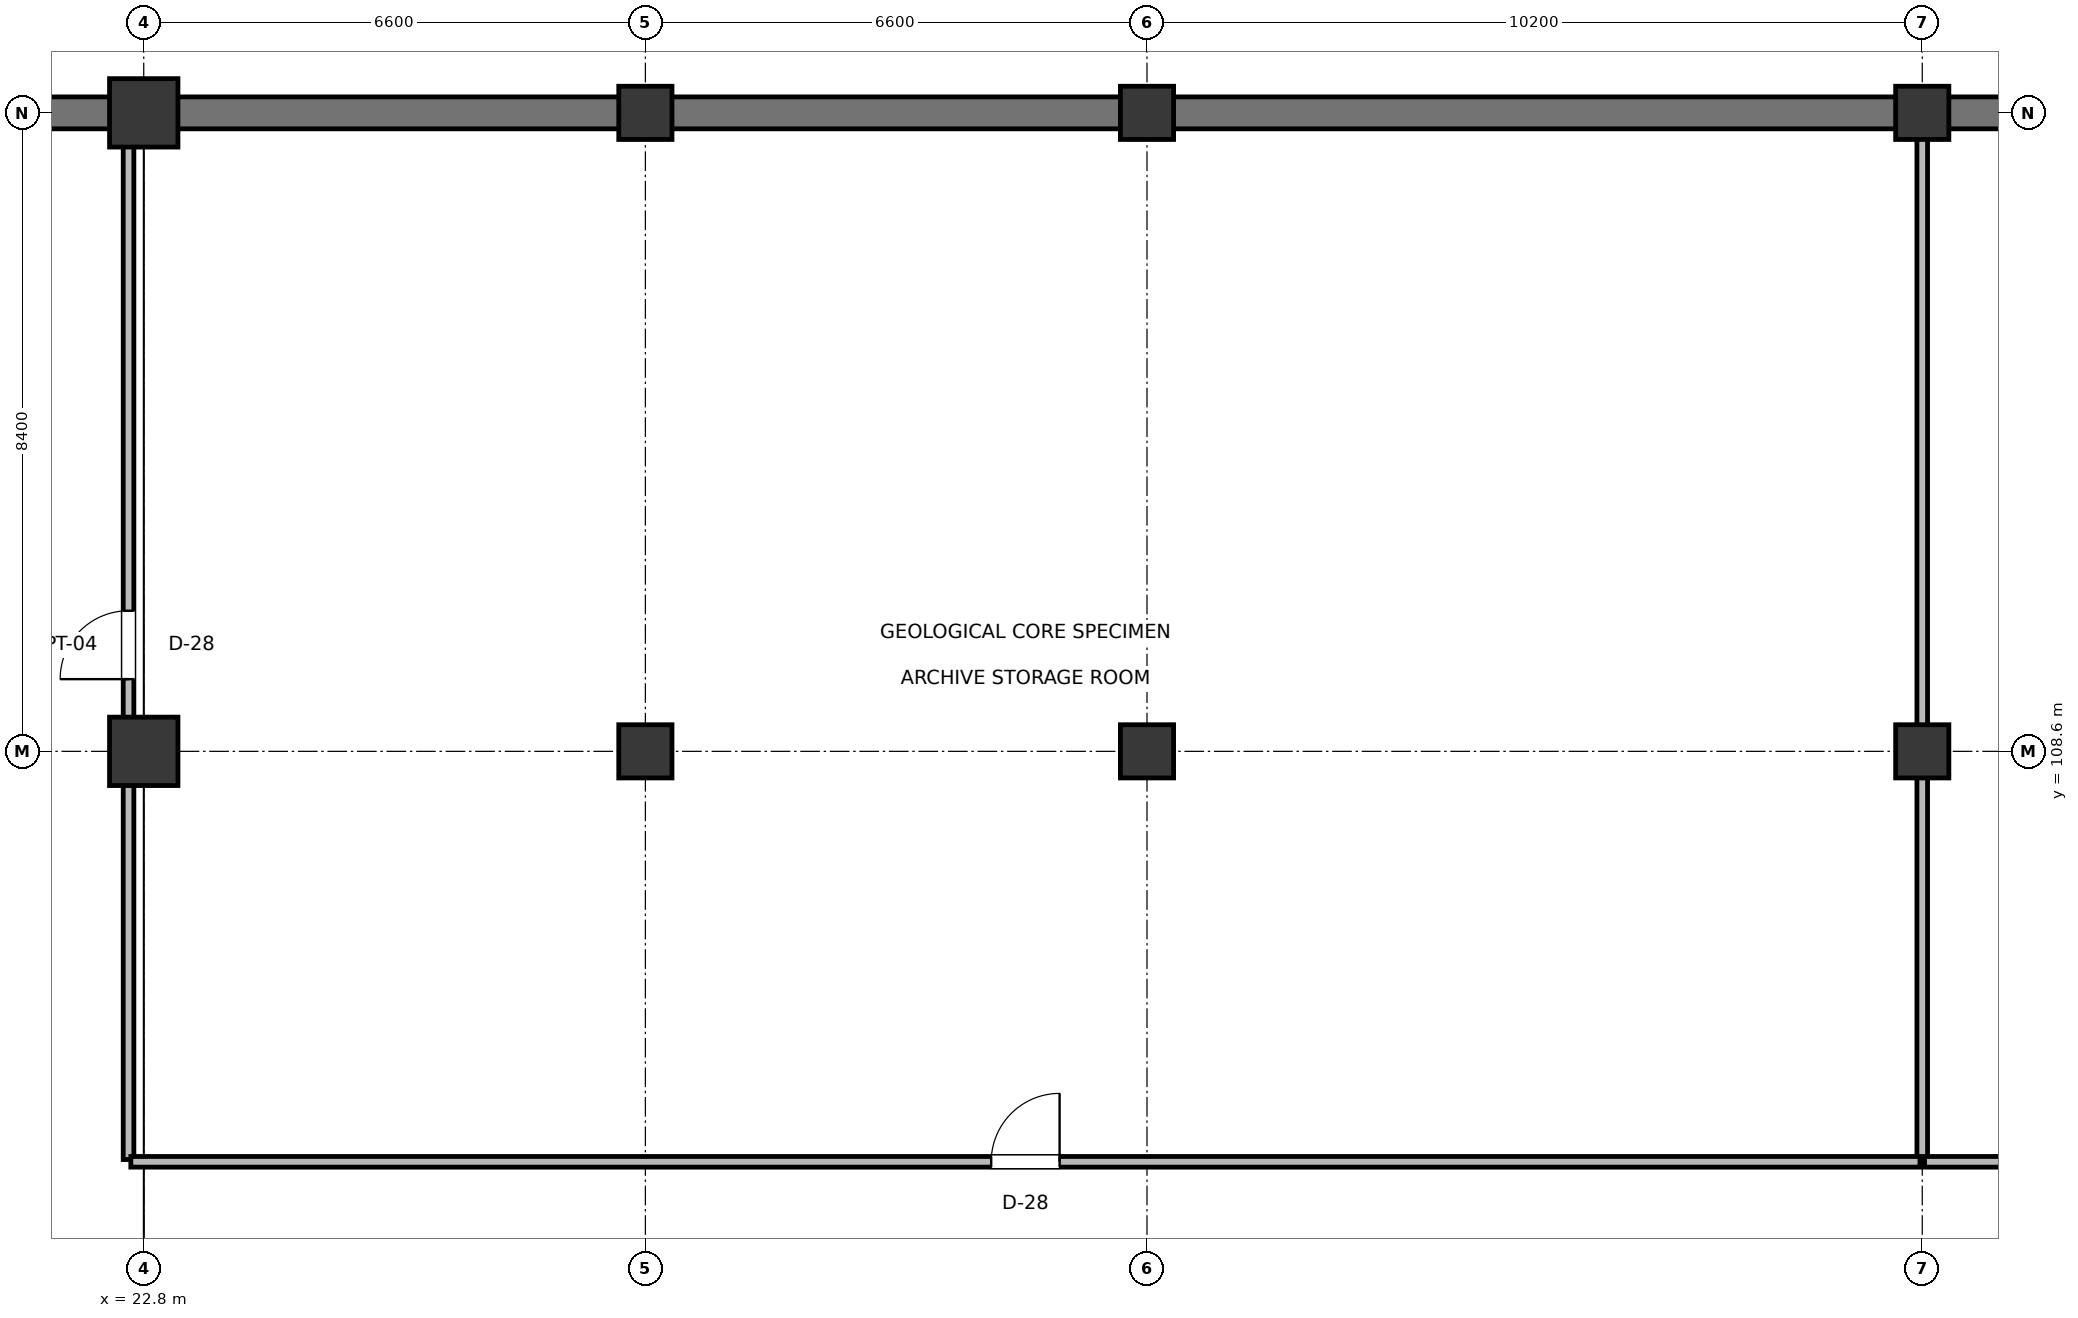
"""IFC4 building model, lengths in metres.
Left out: names, types, materials, properties, quantities, classifications, styles, units other than length and angle.
Written with IfcOpenShell. Run it as: python <this file> out.ifc"""

import sys

from ifc_helpers import new_model, si_unit, direction, frame, frame_2d, origin, origin_2d, place, context, subcontext, project, spatial, rectangle, extrude, element, fill, save


model = new_model("IFC4")
c1 = context("Model", 3, precision=1e-05, world=origin(), true_north=direction((0.0, 1.0)))
c2 = subcontext(c1, "Body", "Model", "MODEL_VIEW")
j1 = project(units=[si_unit("LENGTHUNIT", "METRE"), si_unit("PLANEANGLEUNIT", "RADIAN")], contexts=[c1])
p1 = place(None, origin())
s1 = spatial("IfcSite", under=j1, at=p1, CompositionType="ELEMENT")
p2 = place(p1, origin())
s2 = spatial("IfcBuilding", under=s1, at=p2, CompositionType="ELEMENT")
p3 = place(p2, frame((0.0, 0.0, -4.5)))
s3 = spatial("IfcBuildingStorey", under=s2, at=p3, CompositionType="ELEMENT", Elevation=-4.5)
for number, where, z_axis, x_axis in (
    (1, (22.8, 108.6, 0.0), (0.0, 0.0, 1.0), (1.0, 0.0, 0.0)),
    (2, (22.8, 117.0, 0.0), (0.0, 0.0, 1.0), (1.0, 0.0, 0.0)),
):
    element("IfcColumn", number, at=place(p3, frame(where, z_axis=z_axis, x_axis=x_axis)), inside=s3, PredefinedType="COLUMN", context=c2, shape_type="SweptSolid", body=[
        extrude(rectangle(XDim=0.9, YDim=0.9, at=origin_2d()), origin(), (0.0, 0.0, 1.0), 4.5),
    ])
for number, where, z_axis, x_axis in (
    (3, (29.4, 108.6, 0.0), (0.0, 0.0, 1.0), (1.0, 0.0, 0.0)),
    (4, (29.4, 117.0, 0.0), (0.0, 0.0, 1.0), (1.0, 0.0, 0.0)),
    (5, (36.0, 108.6, 0.0), (0.0, 0.0, 1.0), (1.0, 0.0, 0.0)),
    (6, (36.0, 117.0, 0.0), (0.0, 0.0, 1.0), (1.0, 0.0, 0.0)),
    (7, (46.2, 108.6, 0.0), (0.0, 0.0, 1.0), (1.0, 0.0, 0.0)),
    (8, (46.2, 117.0, 0.0), (0.0, 0.0, 1.0), (1.0, 0.0, 0.0)),
):
    element("IfcColumn", number, at=place(p3, frame(where, z_axis=z_axis, x_axis=x_axis)), inside=s3, PredefinedType="COLUMN", context=c2, shape_type="SweptSolid", body=[
        extrude(rectangle(XDim=0.7, YDim=0.7, at=origin_2d()), origin(), (0.0, 0.0, 1.0), 4.5),
    ])
p4 = place(p3, frame((2.995, 117.0, 0.0), z_axis=(0.0, 0.0, 1.0), x_axis=(1.0, 0.0, 0.0)))
e9 = element("IfcWall", 9, at=p4, inside=s3, PredefinedType="STANDARD", context=c2, shape_type="SweptSolid", body=[
    extrude(rectangle(XDim=81.61, YDim=0.42, at=frame_2d((40.805, 0.0))), origin(), (0.0, 0.0, 1.0), 3.45),
])
p5 = place(p3, frame((22.6, 103.23, 0.0), z_axis=(0.0, 0.0, 1.0), x_axis=(0.0, 1.0, 0.0)))
e10 = element("IfcWall", 10, at=p5, inside=s3, PredefinedType="PARTITIONING", context=c2, shape_type="SweptSolid", body=[
    extrude(rectangle(XDim=13.54, YDim=0.14, at=frame_2d((6.77, 0.0))), origin(), (0.0, 0.0, 1.0), 3.525),
])
p6 = place(p5, frame((6.32, 0.0, 0.0)))
e11 = element("IfcOpeningElement", 11, at=p6, cuts=e10, PredefinedType="OPENING", context=c2, shape_type="SweptSolid", body=[
    extrude(rectangle(XDim=0.9, YDim=2.05, at=frame_2d((0.45, 1.025))), frame((0.0, 0.08, 0.0), z_axis=(0.0, -1.0, 0.0), x_axis=(1.0, 0.0, 0.0)), (0.0, 0.0, 1.0), 0.16),
])
p7 = place(p3, frame((46.2, 103.23, 0.0), z_axis=(0.0, 0.0, 1.0), x_axis=(0.0, 1.0, 0.0)))
e12 = element("IfcWall", 12, at=p7, inside=s3, PredefinedType="PARTITIONING", context=c2, shape_type="SweptSolid", body=[
    extrude(rectangle(XDim=13.54, YDim=0.14, at=frame_2d((6.77, 0.0))), origin(), (0.0, 0.0, 1.0), 3.525),
])
p8 = place(p3, frame((22.63, 103.2, 0.0), z_axis=(0.0, 0.0, 1.0), x_axis=(1.0, 0.0, 0.0)))
e13 = element("IfcWall", 13, at=p8, inside=s3, PredefinedType="PARTITIONING", context=c2, shape_type="SweptSolid", body=[
    extrude(rectangle(XDim=23.54, YDim=0.14, at=frame_2d((11.77, 0.0))), origin(), (0.0, 0.0, 1.0), 3.525),
])
p9 = place(p8, frame((11.32, 0.0, 0.0)))
e14 = element("IfcOpeningElement", 14, at=p9, cuts=e13, PredefinedType="OPENING", context=c2, shape_type="SweptSolid", body=[
    extrude(rectangle(XDim=0.9, YDim=2.05, at=frame_2d((0.45, 1.025))), frame((0.0, 0.08, 0.0), z_axis=(0.0, -1.0, 0.0), x_axis=(1.0, 0.0, 0.0)), (0.0, 0.0, 1.0), 0.16),
])
p10 = place(p3, frame((46.23, 103.2, 0.0), z_axis=(0.0, 0.0, 1.0), x_axis=(1.0, 0.0, 0.0)))
e15 = element("IfcWall", 15, at=p10, inside=s3, PredefinedType="PARTITIONING", context=c2, shape_type="SweptSolid", body=[
    extrude(rectangle(XDim=23.79, YDim=0.14, at=frame_2d((11.895, 0.0))), origin(), (0.0, 0.0, 1.0), 3.525),
])
p11 = place(p10, frame((11.355, 0.0, 0.0)))
e16 = element("IfcOpeningElement", 16, at=p11, cuts=e15, PredefinedType="OPENING", context=c2, shape_type="SweptSolid", body=[
    extrude(rectangle(XDim=1.08, YDim=2.15, at=frame_2d((0.54, 1.075))), frame((0.0, 0.08, 0.0), z_axis=(0.0, -1.0, 0.0), x_axis=(1.0, 0.0, 0.0)), (0.0, 0.0, 1.0), 0.16),
])
p12 = place(p6, origin())
e17 = element("IfcDoor", 17, at=p12, inside=s3, OperationType="SINGLE_SWING_LEFT", PredefinedType="DOOR", context=c2, shape_type="SweptSolid", body=[
    extrude(rectangle(XDim=0.9, YDim=2.05, at=frame_2d((0.45, 1.025))), frame((0.0, 0.025, 0.0), z_axis=(0.0, -1.0, 0.0), x_axis=(1.0, 0.0, 0.0)), (0.0, 0.0, 1.0), 0.05),
])
fill(e11, e17)
p13 = place(p9, origin())
e18 = element("IfcDoor", 18, at=p13, inside=s3, OperationType="SINGLE_SWING_RIGHT", PredefinedType="DOOR", context=c2, shape_type="SweptSolid", body=[
    extrude(rectangle(XDim=0.9, YDim=2.05, at=frame_2d((0.45, 1.025))), frame((0.0, 0.025, 0.0), z_axis=(0.0, -1.0, 0.0), x_axis=(1.0, 0.0, 0.0)), (0.0, 0.0, 1.0), 0.05),
])
fill(e14, e18)
save(model, sys.argv[1])
